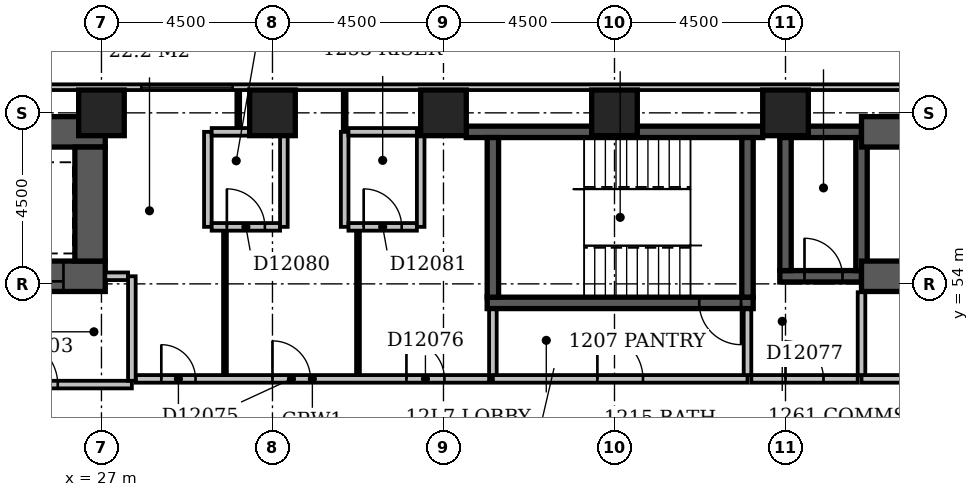
"""IFC4 building model, lengths in metres.
Left out: names, types, materials, properties, quantities, classifications, styles, units other than length and angle.
Written with IfcOpenShell. Run it as: python <this file> out.ifc"""

import sys

from ifc_helpers import new_model, si_unit, direction, frame, frame_2d, origin, origin_2d, place, context, subcontext, project, spatial, rectangle, extrude, element, fill, save


model = new_model("IFC4")
c1 = context("Model", 3, precision=1e-05, world=origin(), true_north=direction((0.0, 1.0)))
c2 = subcontext(c1, "Body", "Model", "MODEL_VIEW")
j1 = project(units=[si_unit("LENGTHUNIT", "METRE"), si_unit("PLANEANGLEUNIT", "RADIAN")], contexts=[c1])
p1 = place(None, origin())
s1 = spatial("IfcSite", under=j1, at=p1, CompositionType="ELEMENT")
p2 = place(p1, origin())
s2 = spatial("IfcBuilding", under=s1, at=p2, CompositionType="ELEMENT")
p3 = place(p2, frame((0.0, 0.0, 54.2)))
s3 = spatial("IfcBuildingStorey", under=s2, at=p3, CompositionType="ELEMENT", Elevation=54.2)
p4 = place(p3, frame((23.8, 54.2, -0.3), z_axis=(0.0, 0.0, 1.0), x_axis=(1.0, 0.0, 0.0)))
e1 = element("IfcWall", 1, at=p4, inside=s3, PredefinedType="SHEAR", context=c2, shape_type="SweptSolid", body=[
    extrude(rectangle(XDim=3.3, YDim=0.8, at=frame_2d((1.65, 0.0))), origin(), (0.0, 0.0, 1.0), 3.6),
])
p5 = place(p4, frame((1.1, 0.0, 0.3)))
e2 = element("IfcOpeningElement", 2, at=p5, cuts=e1, PredefinedType="OPENING", context=c2, shape_type="SweptSolid", body=[
    extrude(rectangle(XDim=1.1, YDim=2.1, at=frame_2d((0.55, 1.05))), frame((0.0, 0.412, 0.0), z_axis=(0.0, -1.0, 0.0), x_axis=(1.0, 0.0, 0.0)), (0.0, 0.0, 1.0), 0.824),
])
p6 = place(p3, frame((23.8, 58.0, -0.3), z_axis=(0.0, 0.0, 1.0), x_axis=(1.0, 0.0, 0.0)))
e3 = element("IfcWall", 3, at=p6, inside=s3, PredefinedType="SHEAR", context=c2, shape_type="SweptSolid", body=[
    extrude(rectangle(XDim=3.3, YDim=0.8, at=frame_2d((1.65, 0.0))), origin(), (0.0, 0.0, 1.0), 3.6),
])
p7 = place(p3, frame((26.7, 54.6, -0.3), z_axis=(0.0, 0.0, 1.0), x_axis=(0.0, 1.0, 0.0)))
e4 = element("IfcWall", 4, at=p7, inside=s3, PredefinedType="SHEAR", context=c2, shape_type="SweptSolid", body=[
    extrude(rectangle(XDim=3.0, YDim=0.8, at=frame_2d((1.5, 0.0))), origin(), (0.0, 0.0, 1.0), 3.6),
])
p8 = place(p3, frame((36.6, 58.0, -0.3), z_axis=(0.0, 0.0, 1.0), x_axis=(1.0, 0.0, 0.0)))
e5 = element("IfcWall", 5, at=p8, inside=s3, PredefinedType="SHEAR", context=c2, shape_type="SweptSolid", body=[
    extrude(rectangle(XDim=7.8, YDim=0.3, at=frame_2d((3.9, 0.0))), origin(), (0.0, 0.0, 1.0), 3.6),
])
p9 = place(p3, frame((37.15, 53.5, -0.3), z_axis=(0.0, 0.0, 1.0), x_axis=(1.0, 0.0, 0.0)))
e6 = element("IfcWall", 6, at=p9, inside=s3, PredefinedType="SHEAR", context=c2, shape_type="SweptSolid", body=[
    extrude(rectangle(XDim=7.0, YDim=0.3, at=frame_2d((3.5, 0.0))), origin(), (0.0, 0.0, 1.0), 3.6),
])
p10 = place(p9, frame((5.58, 0.0, 0.3)))
e7 = element("IfcOpeningElement", 7, at=p10, cuts=e6, PredefinedType="OPENING", context=c2, shape_type="SweptSolid", body=[
    extrude(rectangle(XDim=1.1, YDim=2.1, at=frame_2d((0.55, 1.05))), frame((0.0, 0.162, 0.0), z_axis=(0.0, -1.0, 0.0), x_axis=(1.0, 0.0, 0.0)), (0.0, 0.0, 1.0), 0.324),
])
for number, where, z_axis, x_axis in (
    (8, (37.3, 53.65, -0.3), (0.0, 0.0, 1.0), (0.0, 1.0, 0.0)),
    (9, (44.0, 53.65, -0.3), (0.0, 0.0, 1.0), (0.0, 1.0, 0.0)),
):
    element("IfcWall", number, at=place(p3, frame(where, z_axis=z_axis, x_axis=x_axis)), inside=s3, PredefinedType="SHEAR", context=c2, shape_type="SweptSolid", body=[
        extrude(rectangle(XDim=4.2, YDim=0.3, at=frame_2d((2.1, 0.0))), origin(), (0.0, 0.0, 1.0), 3.6),
    ])
p11 = place(p3, frame((44.85, 54.2, -0.3), z_axis=(0.0, 0.0, 1.0), x_axis=(1.0, 0.0, 0.0)))
e10 = element("IfcWall", 10, at=p11, inside=s3, PredefinedType="SHEAR", context=c2, shape_type="SweptSolid", body=[
    extrude(rectangle(XDim=2.15, YDim=0.3, at=frame_2d((1.075, 0.0))), origin(), (0.0, 0.0, 1.0), 3.6),
])
p12 = place(p11, frame((0.65, 0.0, 0.3)))
e11 = element("IfcOpeningElement", 11, at=p12, cuts=e10, PredefinedType="OPENING", context=c2, shape_type="SweptSolid", body=[
    extrude(rectangle(XDim=1.0, YDim=2.1, at=frame_2d((0.5, 1.05))), frame((0.0, 0.162, 0.0), z_axis=(0.0, -1.0, 0.0), x_axis=(1.0, 0.0, 0.0)), (0.0, 0.0, 1.0), 0.324),
])
p13 = place(p3, frame((44.85, 58.0, -0.3), z_axis=(0.0, 0.0, 1.0), x_axis=(1.0, 0.0, 0.0)))
e12 = element("IfcWall", 12, at=p13, inside=s3, PredefinedType="SHEAR", context=c2, shape_type="SweptSolid", body=[
    extrude(rectangle(XDim=2.15, YDim=0.3, at=frame_2d((1.075, 0.0))), origin(), (0.0, 0.0, 1.0), 3.6),
])
p14 = place(p3, frame((45.0, 54.35, -0.3), z_axis=(0.0, 0.0, 1.0), x_axis=(0.0, 1.0, 0.0)))
e13 = element("IfcWall", 13, at=p14, inside=s3, PredefinedType="SHEAR", context=c2, shape_type="SweptSolid", body=[
    extrude(rectangle(XDim=3.5, YDim=0.3, at=frame_2d((1.75, 0.0))), origin(), (0.0, 0.0, 1.0), 3.6),
])
p15 = place(p3, frame((47.0, 54.2, -0.3), z_axis=(0.0, 0.0, 1.0), x_axis=(1.0, 0.0, 0.0)))
e14 = element("IfcWall", 14, at=p15, inside=s3, PredefinedType="SHEAR", context=c2, shape_type="SweptSolid", body=[
    extrude(rectangle(XDim=5.4, YDim=0.8, at=frame_2d((2.7, 0.0))), origin(), (0.0, 0.0, 1.0), 3.6),
])
p16 = place(p3, frame((47.0, 54.35, -0.3), z_axis=(0.0, 0.0, 1.0), x_axis=(0.0, 1.0, 0.0)))
e15 = element("IfcWall", 15, at=p16, inside=s3, PredefinedType="SHEAR", context=c2, shape_type="SweptSolid", body=[
    extrude(rectangle(XDim=3.5, YDim=0.3, at=frame_2d((1.75, 0.0))), origin(), (0.0, 0.0, 1.0), 3.6),
])
p17 = place(p3, frame((47.0, 58.0, -0.3), z_axis=(0.0, 0.0, 1.0), x_axis=(1.0, 0.0, 0.0)))
e16 = element("IfcWall", 16, at=p17, inside=s3, PredefinedType="SHEAR", context=c2, shape_type="SweptSolid", body=[
    extrude(rectangle(XDim=5.4, YDim=0.8, at=frame_2d((2.7, 0.0))), origin(), (0.0, 0.0, 1.0), 3.6),
])
for number, where, z_axis, x_axis in (
    (17, (27.0, 58.5, -0.3), (0.0, 0.0, 1.0), (1.0, 0.0, 0.0)),
    (18, (31.5, 58.5, -0.3), (0.0, 0.0, 1.0), (1.0, 0.0, 0.0)),
    (19, (36.0, 58.5, -0.3), (0.0, 0.0, 1.0), (1.0, 0.0, 0.0)),
    (20, (40.5, 58.5, -0.3), (0.0, 0.0, 1.0), (1.0, 0.0, 0.0)),
    (21, (45.0, 58.5, -0.3), (0.0, 0.0, 1.0), (1.0, 0.0, 0.0)),
):
    element("IfcColumn", number, at=place(p3, frame(where, z_axis=z_axis, x_axis=x_axis)), inside=s3, PredefinedType="COLUMN", context=c2, shape_type="SweptSolid", body=[
        extrude(rectangle(XDim=1.2, YDim=1.2, at=origin_2d()), origin(), (0.0, 0.0, 1.0), 3.6),
    ])
p18 = place(p3, frame((68.1, 59.175, 0.0), z_axis=(0.0, 0.0, 1.0), x_axis=(-1.0, 0.0, 0.0)))
e22 = element("IfcWall", 22, at=p18, inside=s3, PredefinedType="STANDARD", context=c2, shape_type="SweptSolid", body=[
    extrude(rectangle(XDim=68.85, YDim=0.15, at=frame_2d((34.425, 0.0))), origin(), (0.0, 0.0, 1.0), 2.7),
])
p19 = place(p18, frame((1.53, 0.0, 0.6)))
e23 = element("IfcOpeningElement", 23, at=p19, cuts=e22, PredefinedType="OPENING", context=c2, shape_type="SweptSolid", body=[
    extrude(rectangle(XDim=1.5, YDim=1.8, at=frame_2d((0.75, 0.9))), frame((0.0, 0.087, 0.0), z_axis=(0.0, -1.0, 0.0), x_axis=(1.0, 0.0, 0.0)), (0.0, 0.0, 1.0), 0.174),
])
p20 = place(p18, frame((6.15, 0.0, 0.6)))
e24 = element("IfcOpeningElement", 24, at=p20, cuts=e22, PredefinedType="OPENING", context=c2, shape_type="SweptSolid", body=[
    extrude(rectangle(XDim=2.4, YDim=1.8, at=frame_2d((1.2, 0.9))), frame((0.0, 0.087, 0.0), z_axis=(0.0, -1.0, 0.0), x_axis=(1.0, 0.0, 0.0)), (0.0, 0.0, 1.0), 0.174),
])
p21 = place(p18, frame((37.65, 0.0, 0.6)))
e25 = element("IfcOpeningElement", 25, at=p21, cuts=e22, PredefinedType="OPENING", context=c2, shape_type="SweptSolid", body=[
    extrude(rectangle(XDim=2.4, YDim=1.8, at=frame_2d((1.2, 0.9))), frame((0.0, 0.087, 0.0), z_axis=(0.0, -1.0, 0.0), x_axis=(1.0, 0.0, 0.0)), (0.0, 0.0, 1.0), 0.174),
])
p22 = place(p3, frame((47.0, 51.5, 0.0), z_axis=(0.0, 0.0, 1.0), x_axis=(1.0, 0.0, 0.0)))
e26 = element("IfcWall", 26, at=p22, inside=s3, PredefinedType="PARTITIONING", context=c2, shape_type="SweptSolid", body=[
    extrude(rectangle(XDim=5.0, YDim=0.2, at=frame_2d((2.5, 0.0))), origin(), (0.0, 0.0, 1.0), 3.3),
])
p23 = place(p22, frame((1.9, 0.0, 0.0)))
e27 = element("IfcOpeningElement", 27, at=p23, cuts=e26, PredefinedType="OPENING", context=c2, shape_type="SweptSolid", body=[
    extrude(rectangle(XDim=1.2, YDim=2.1, at=frame_2d((0.6, 1.05))), frame((0.0, 0.112, 0.0), z_axis=(0.0, -1.0, 0.0), x_axis=(1.0, 0.0, 0.0)), (0.0, 0.0, 1.0), 0.224),
])
p24 = place(p3, frame((47.0, 51.6, 0.0), z_axis=(0.0, 0.0, 1.0), x_axis=(0.0, 1.0, 0.0)))
e28 = element("IfcWall", 28, at=p24, inside=s3, PredefinedType="PARTITIONING", context=c2, shape_type="SweptSolid", body=[
    extrude(rectangle(XDim=2.18, YDim=0.2, at=frame_2d((1.09, 0.0))), origin(), (0.0, 0.0, 1.0), 3.3),
])
p25 = place(p3, frame((23.0, 51.35, 0.0), z_axis=(0.0, 0.0, 1.0), x_axis=(1.0, 0.0, 0.0)))
e29 = element("IfcWall", 29, at=p25, inside=s3, PredefinedType="PARTITIONING", context=c2, shape_type="SweptSolid", body=[
    extrude(rectangle(XDim=4.8, YDim=0.2, at=frame_2d((2.4, 0.0))), origin(), (0.0, 0.0, 1.0), 3.3),
])
p26 = place(p25, frame((1.65, 0.0, 0.0)))
e30 = element("IfcOpeningElement", 30, at=p26, cuts=e29, PredefinedType="OPENING", context=c2, shape_type="SweptSolid", body=[
    extrude(rectangle(XDim=1.2, YDim=2.1, at=frame_2d((0.6, 1.05))), frame((0.0, 0.112, 0.0), z_axis=(0.0, -1.0, 0.0), x_axis=(1.0, 0.0, 0.0)), (0.0, 0.0, 1.0), 0.224),
])
p27 = place(p3, frame((27.8, 51.45, 0.0), z_axis=(0.0, 0.0, 1.0), x_axis=(0.0, 1.0, 0.0)))
e31 = element("IfcWall", 31, at=p27, inside=s3, PredefinedType="PARTITIONING", context=c2, shape_type="SweptSolid", body=[
    extrude(rectangle(XDim=2.75, YDim=0.2, at=frame_2d((1.375, 0.0))), origin(), (0.0, 0.0, 1.0), 3.3),
])
p28 = place(p3, frame((27.1, 54.2, 0.0), z_axis=(0.0, 0.0, 1.0), x_axis=(1.0, 0.0, 0.0)))
e32 = element("IfcWall", 32, at=p28, inside=s3, PredefinedType="PARTITIONING", context=c2, shape_type="SweptSolid", body=[
    extrude(rectangle(XDim=0.6, YDim=0.2, at=frame_2d((0.3, 0.0))), origin(), (0.0, 0.0, 1.0), 3.3),
])
p29 = place(p3, frame((37.3, 51.5, 0.0), z_axis=(0.0, 0.0, 1.0), x_axis=(1.0, 0.0, 0.0)))
e33 = element("IfcWall", 33, at=p29, inside=s3, PredefinedType="PARTITIONING", context=c2, shape_type="SweptSolid", body=[
    extrude(rectangle(XDim=6.7, YDim=0.2, at=frame_2d((3.35, 0.0))), origin(), (0.0, 0.0, 1.0), 3.3),
])
p30 = place(p29, frame((2.75, 0.0, 0.0)))
e34 = element("IfcOpeningElement", 34, at=p30, cuts=e33, PredefinedType="OPENING", context=c2, shape_type="SweptSolid", body=[
    extrude(rectangle(XDim=1.2, YDim=2.1, at=frame_2d((0.6, 1.05))), frame((0.0, 0.112, 0.0), z_axis=(0.0, -1.0, 0.0), x_axis=(1.0, 0.0, 0.0)), (0.0, 0.0, 1.0), 0.224),
])
for number, where, z_axis, x_axis in (
    (35, (44.0, 51.6, 0.0), (0.0, 0.0, 1.0), (0.0, 1.0, 0.0)),
    (36, (37.3, 51.6, 0.0), (0.0, 0.0, 1.0), (0.0, 1.0, 0.0)),
):
    element("IfcWall", number, at=place(p3, frame(where, z_axis=z_axis, x_axis=x_axis)), inside=s3, PredefinedType="PARTITIONING", context=c2, shape_type="SweptSolid", body=[
        extrude(rectangle(XDim=1.73, YDim=0.2, at=frame_2d((0.865, 0.0))), origin(), (0.0, 0.0, 1.0), 3.3),
    ])
p31 = place(p3, frame((27.9, 51.5, 0.0), z_axis=(0.0, 0.0, 1.0), x_axis=(1.0, 0.0, 0.0)))
e37 = element("IfcWall", 37, at=p31, inside=s3, PredefinedType="PARTITIONING", context=c2, shape_type="SweptSolid", body=[
    extrude(rectangle(XDim=9.3, YDim=0.2, at=frame_2d((4.65, 0.0))), origin(), (0.0, 0.0, 1.0), 3.3),
])
p32 = place(p31, frame((0.675, 0.0, 0.0)))
e38 = element("IfcOpeningElement", 38, at=p32, cuts=e37, PredefinedType="OPENING", context=c2, shape_type="SweptSolid", body=[
    extrude(rectangle(XDim=0.9, YDim=2.1, at=frame_2d((0.45, 1.05))), frame((0.0, 0.112, 0.0), z_axis=(0.0, -1.0, 0.0), x_axis=(1.0, 0.0, 0.0)), (0.0, 0.0, 1.0), 0.224),
])
p33 = place(p31, frame((3.6, 0.0, 0.0)))
e39 = element("IfcOpeningElement", 39, at=p33, cuts=e37, PredefinedType="OPENING", context=c2, shape_type="SweptSolid", body=[
    extrude(rectangle(XDim=1.0, YDim=2.1, at=frame_2d((0.5, 1.05))), frame((0.0, 0.112, 0.0), z_axis=(0.0, -1.0, 0.0), x_axis=(1.0, 0.0, 0.0)), (0.0, 0.0, 1.0), 0.224),
])
p34 = place(p31, frame((7.125, 0.0, 0.0)))
e40 = element("IfcOpeningElement", 40, at=p34, cuts=e37, PredefinedType="OPENING", context=c2, shape_type="SweptSolid", body=[
    extrude(rectangle(XDim=1.0, YDim=2.1, at=frame_2d((0.5, 1.05))), frame((0.0, 0.112, 0.0), z_axis=(0.0, -1.0, 0.0), x_axis=(1.0, 0.0, 0.0)), (0.0, 0.0, 1.0), 0.224),
])
p35 = place(p3, frame((44.1, 51.5, 0.0), z_axis=(0.0, 0.0, 1.0), x_axis=(1.0, 0.0, 0.0)))
e41 = element("IfcWall", 41, at=p35, inside=s3, PredefinedType="PARTITIONING", context=c2, shape_type="SweptSolid", body=[
    extrude(rectangle(XDim=2.8, YDim=0.2, at=frame_2d((1.4, 0.0))), origin(), (0.0, 0.0, 1.0), 3.3),
])
p36 = place(p35, frame((0.9, 0.0, 0.0)))
e42 = element("IfcOpeningElement", 42, at=p36, cuts=e41, PredefinedType="OPENING", context=c2, shape_type="SweptSolid", body=[
    extrude(rectangle(XDim=1.0, YDim=2.1, at=frame_2d((0.5, 1.05))), frame((0.0, 0.112, 0.0), z_axis=(0.0, -1.0, 0.0), x_axis=(1.0, 0.0, 0.0)), (0.0, 0.0, 1.0), 0.224),
])
for number, where, z_axis, x_axis in (
    (43, (30.25, 51.6, 0.0), (0.0, 0.0, 1.0), (0.0, 1.0, 0.0)),
    (44, (33.75, 51.6, 0.0), (0.0, 0.0, 1.0), (0.0, 1.0, 0.0)),
):
    element("IfcWall", number, at=place(p3, frame(where, z_axis=z_axis, x_axis=x_axis)), inside=s3, PredefinedType="PARTITIONING", context=c2, shape_type="SweptSolid", body=[
        extrude(rectangle(XDim=3.8, YDim=0.1, at=frame_2d((1.9, 0.0))), origin(), (0.0, 0.0, 1.0), 3.3),
    ])
p37 = place(p3, frame((29.8, 55.5, 0.0), z_axis=(0.0, 0.0, 1.0), x_axis=(0.0, 1.0, 0.0)))
e45 = element("IfcWall", 45, at=p37, inside=s3, PredefinedType="PARTITIONING", context=c2, shape_type="SweptSolid", body=[
    extrude(rectangle(XDim=2.5, YDim=0.2, at=frame_2d((1.25, 0.0))), origin(), (0.0, 0.0, 1.0), 3.3),
])
p38 = place(p3, frame((29.9, 55.5, 0.0), z_axis=(0.0, 0.0, 1.0), x_axis=(1.0, 0.0, 0.0)))
e46 = element("IfcWall", 46, at=p38, inside=s3, PredefinedType="PARTITIONING", context=c2, shape_type="SweptSolid", body=[
    extrude(rectangle(XDim=1.8, YDim=0.2, at=frame_2d((0.9, 0.0))), origin(), (0.0, 0.0, 1.0), 3.3),
])
p39 = place(p38, frame((0.4, 0.0, 0.0)))
e47 = element("IfcOpeningElement", 47, at=p39, cuts=e46, PredefinedType="OPENING", context=c2, shape_type="SweptSolid", body=[
    extrude(rectangle(XDim=1.0, YDim=2.1, at=frame_2d((0.5, 1.05))), frame((0.0, 0.112, 0.0), z_axis=(0.0, -1.0, 0.0), x_axis=(1.0, 0.0, 0.0)), (0.0, 0.0, 1.0), 0.224),
])
for number, where, z_axis, x_axis in (
    (48, (31.8, 55.5, 0.0), (0.0, 0.0, 1.0), (0.0, 1.0, 0.0)),
    (49, (33.4, 55.5, 0.0), (0.0, 0.0, 1.0), (0.0, 1.0, 0.0)),
):
    element("IfcWall", number, at=place(p3, frame(where, z_axis=z_axis, x_axis=x_axis)), inside=s3, PredefinedType="PARTITIONING", context=c2, shape_type="SweptSolid", body=[
        extrude(rectangle(XDim=2.5, YDim=0.2, at=frame_2d((1.25, 0.0))), origin(), (0.0, 0.0, 1.0), 3.3),
    ])
p40 = place(p3, frame((33.5, 55.5, 0.0), z_axis=(0.0, 0.0, 1.0), x_axis=(1.0, 0.0, 0.0)))
e50 = element("IfcWall", 50, at=p40, inside=s3, PredefinedType="PARTITIONING", context=c2, shape_type="SweptSolid", body=[
    extrude(rectangle(XDim=1.8, YDim=0.2, at=frame_2d((0.9, 0.0))), origin(), (0.0, 0.0, 1.0), 3.3),
])
p41 = place(p40, frame((0.4, 0.0, 0.0)))
e51 = element("IfcOpeningElement", 51, at=p41, cuts=e50, PredefinedType="OPENING", context=c2, shape_type="SweptSolid", body=[
    extrude(rectangle(XDim=1.0, YDim=2.1, at=frame_2d((0.5, 1.05))), frame((0.0, 0.112, 0.0), z_axis=(0.0, -1.0, 0.0), x_axis=(1.0, 0.0, 0.0)), (0.0, 0.0, 1.0), 0.224),
])
p42 = place(p3, frame((35.4, 55.5, 0.0), z_axis=(0.0, 0.0, 1.0), x_axis=(0.0, 1.0, 0.0)))
e52 = element("IfcWall", 52, at=p42, inside=s3, PredefinedType="PARTITIONING", context=c2, shape_type="SweptSolid", body=[
    extrude(rectangle(XDim=2.5, YDim=0.2, at=frame_2d((1.25, 0.0))), origin(), (0.0, 0.0, 1.0), 2.4),
])
p43 = place(p3, frame((29.9, 58.0, 0.0), z_axis=(0.0, 0.0, 1.0), x_axis=(1.0, 0.0, 0.0)))
e53 = element("IfcWall", 53, at=p43, inside=s3, PredefinedType="PARTITIONING", context=c2, shape_type="SweptSolid", body=[
    extrude(rectangle(XDim=1.8, YDim=0.2, at=frame_2d((0.9, 0.0))), origin(), (0.0, 0.0, 1.0), 3.3),
])
p44 = place(p3, frame((33.4, 58.0, 0.0), z_axis=(0.0, 0.0, 1.0), x_axis=(0.0, 1.0, 0.0)))
e54 = element("IfcWall", 54, at=p44, inside=s3, PredefinedType="PARTITIONING", context=c2, shape_type="SweptSolid", body=[
    extrude(rectangle(XDim=1.1, YDim=0.1, at=frame_2d((0.55, 0.0))), origin(), (0.0, 0.0, 1.0), 3.3),
])
p45 = place(p3, frame((33.5, 58.0, 0.0), z_axis=(0.0, 0.0, 1.0), x_axis=(1.0, 0.0, 0.0)))
e55 = element("IfcWall", 55, at=p45, inside=s3, PredefinedType="PARTITIONING", context=c2, shape_type="SweptSolid", body=[
    extrude(rectangle(XDim=1.8, YDim=0.2, at=frame_2d((0.9, 0.0))), origin(), (0.0, 0.0, 1.0), 3.3),
])
p46 = place(p3, frame((30.6, 58.1, 0.0), z_axis=(0.0, 0.0, 1.0), x_axis=(0.0, 1.0, 0.0)))
e56 = element("IfcWall", 56, at=p46, inside=s3, PredefinedType="PARTITIONING", context=c2, shape_type="SweptSolid", body=[
    extrude(rectangle(XDim=1.0, YDim=0.1, at=frame_2d((0.5, 0.0))), origin(), (0.0, 0.0, 1.0), 3.3),
])
p47 = place(p21, origin())
e57 = element("IfcWindow", 57, at=p47, inside=s3, PartitioningType="SINGLE_PANEL", PredefinedType="WINDOW", context=c2, shape_type="SweptSolid", body=[
    extrude(rectangle(XDim=2.4, YDim=1.8, at=frame_2d((1.2, 0.9))), frame((0.0, 0.03, 0.0), z_axis=(0.0, -1.0, 0.0), x_axis=(1.0, 0.0, 0.0)), (0.0, 0.0, 1.0), 0.06),
])
fill(e25, e57)
p48 = place(p26, origin())
e58 = element("IfcDoor", 58, at=p48, inside=s3, OperationType="SINGLE_SWING_LEFT", PredefinedType="DOOR", context=c2, shape_type="SweptSolid", body=[
    extrude(rectangle(XDim=1.2, YDim=2.1, at=frame_2d((0.6, 1.05))), frame((0.0, 0.025, 0.0), z_axis=(0.0, -1.0, 0.0), x_axis=(1.0, 0.0, 0.0)), (0.0, 0.0, 1.0), 0.05),
])
fill(e30, e58)
p49 = place(p5, origin())
e59 = element("IfcDoor", 59, at=p49, inside=s3, OperationType="SLIDING_TO_LEFT", PredefinedType="DOOR", context=c2, shape_type="SweptSolid", body=[
    extrude(rectangle(XDim=1.1, YDim=2.1, at=frame_2d((0.55, 1.05))), frame((0.0, 0.025, 0.0), z_axis=(0.0, -1.0, 0.0), x_axis=(1.0, 0.0, 0.0)), (0.0, 0.0, 1.0), 0.05),
])
fill(e2, e59)
p50 = place(p30, origin())
e60 = element("IfcDoor", 60, at=p50, inside=s3, OperationType="SINGLE_SWING_LEFT", PredefinedType="DOOR", context=c2, shape_type="SweptSolid", body=[
    extrude(rectangle(XDim=1.2, YDim=2.1, at=frame_2d((0.6, 1.05))), frame((0.0, 0.025, 0.0), z_axis=(0.0, -1.0, 0.0), x_axis=(1.0, 0.0, 0.0)), (0.0, 0.0, 1.0), 0.05),
])
fill(e34, e60)
p51 = place(p12, origin())
e61 = element("IfcDoor", 61, at=p51, inside=s3, OperationType="SINGLE_SWING_LEFT", PredefinedType="DOOR", context=c2, shape_type="SweptSolid", body=[
    extrude(rectangle(XDim=1.0, YDim=2.1, at=frame_2d((0.5, 1.05))), frame((0.0, 0.025, 0.0), z_axis=(0.0, -1.0, 0.0), x_axis=(1.0, 0.0, 0.0)), (0.0, 0.0, 1.0), 0.05),
])
fill(e11, e61)
p52 = place(p10, origin())
e62 = element("IfcDoor", 62, at=p52, inside=s3, OperationType="SINGLE_SWING_RIGHT", PredefinedType="DOOR", context=c2, shape_type="SweptSolid", body=[
    extrude(rectangle(XDim=1.1, YDim=2.1, at=frame_2d((0.55, 1.05))), frame((0.0, 0.025, 0.0), z_axis=(0.0, -1.0, 0.0), x_axis=(1.0, 0.0, 0.0)), (0.0, 0.0, 1.0), 0.05),
])
fill(e7, e62)
p53 = place(p32, origin())
e63 = element("IfcDoor", 63, at=p53, inside=s3, OperationType="SINGLE_SWING_LEFT", PredefinedType="DOOR", context=c2, shape_type="SweptSolid", body=[
    extrude(rectangle(XDim=0.9, YDim=2.1, at=frame_2d((0.45, 1.05))), frame((0.0, 0.025, 0.0), z_axis=(0.0, -1.0, 0.0), x_axis=(1.0, 0.0, 0.0)), (0.0, 0.0, 1.0), 0.05),
])
fill(e38, e63)
p54 = place(p33, origin())
e64 = element("IfcDoor", 64, at=p54, inside=s3, OperationType="SINGLE_SWING_LEFT", PredefinedType="DOOR", context=c2, shape_type="SweptSolid", body=[
    extrude(rectangle(XDim=1.0, YDim=2.1, at=frame_2d((0.5, 1.05))), frame((0.0, 0.025, 0.0), z_axis=(0.0, -1.0, 0.0), x_axis=(1.0, 0.0, 0.0)), (0.0, 0.0, 1.0), 0.05),
])
fill(e39, e64)
p55 = place(p34, origin())
e65 = element("IfcDoor", 65, at=p55, inside=s3, OperationType="SINGLE_SWING_LEFT", PredefinedType="DOOR", context=c2, shape_type="SweptSolid", body=[
    extrude(rectangle(XDim=1.0, YDim=2.1, at=frame_2d((0.5, 1.05))), frame((0.0, 0.025, 0.0), z_axis=(0.0, -1.0, 0.0), x_axis=(1.0, 0.0, 0.0)), (0.0, 0.0, 1.0), 0.05),
])
fill(e40, e65)
p56 = place(p36, origin())
e66 = element("IfcDoor", 66, at=p56, inside=s3, OperationType="SINGLE_SWING_LEFT", PredefinedType="DOOR", context=c2, shape_type="SweptSolid", body=[
    extrude(rectangle(XDim=1.0, YDim=2.1, at=frame_2d((0.5, 1.05))), frame((0.0, 0.025, 0.0), z_axis=(0.0, -1.0, 0.0), x_axis=(1.0, 0.0, 0.0)), (0.0, 0.0, 1.0), 0.05),
])
fill(e42, e66)
p57 = place(p39, origin())
e67 = element("IfcDoor", 67, at=p57, inside=s3, OperationType="SINGLE_SWING_LEFT", PredefinedType="DOOR", context=c2, shape_type="SweptSolid", body=[
    extrude(rectangle(XDim=1.0, YDim=2.1, at=frame_2d((0.5, 1.05))), frame((0.0, 0.025, 0.0), z_axis=(0.0, -1.0, 0.0), x_axis=(1.0, 0.0, 0.0)), (0.0, 0.0, 1.0), 0.05),
])
fill(e47, e67)
p58 = place(p41, origin())
e68 = element("IfcDoor", 68, at=p58, inside=s3, OperationType="SINGLE_SWING_LEFT", PredefinedType="DOOR", context=c2, shape_type="SweptSolid", body=[
    extrude(rectangle(XDim=1.0, YDim=2.1, at=frame_2d((0.5, 1.05))), frame((0.0, 0.025, 0.0), z_axis=(0.0, -1.0, 0.0), x_axis=(1.0, 0.0, 0.0)), (0.0, 0.0, 1.0), 0.05),
])
fill(e51, e68)
save(model, sys.argv[1])
